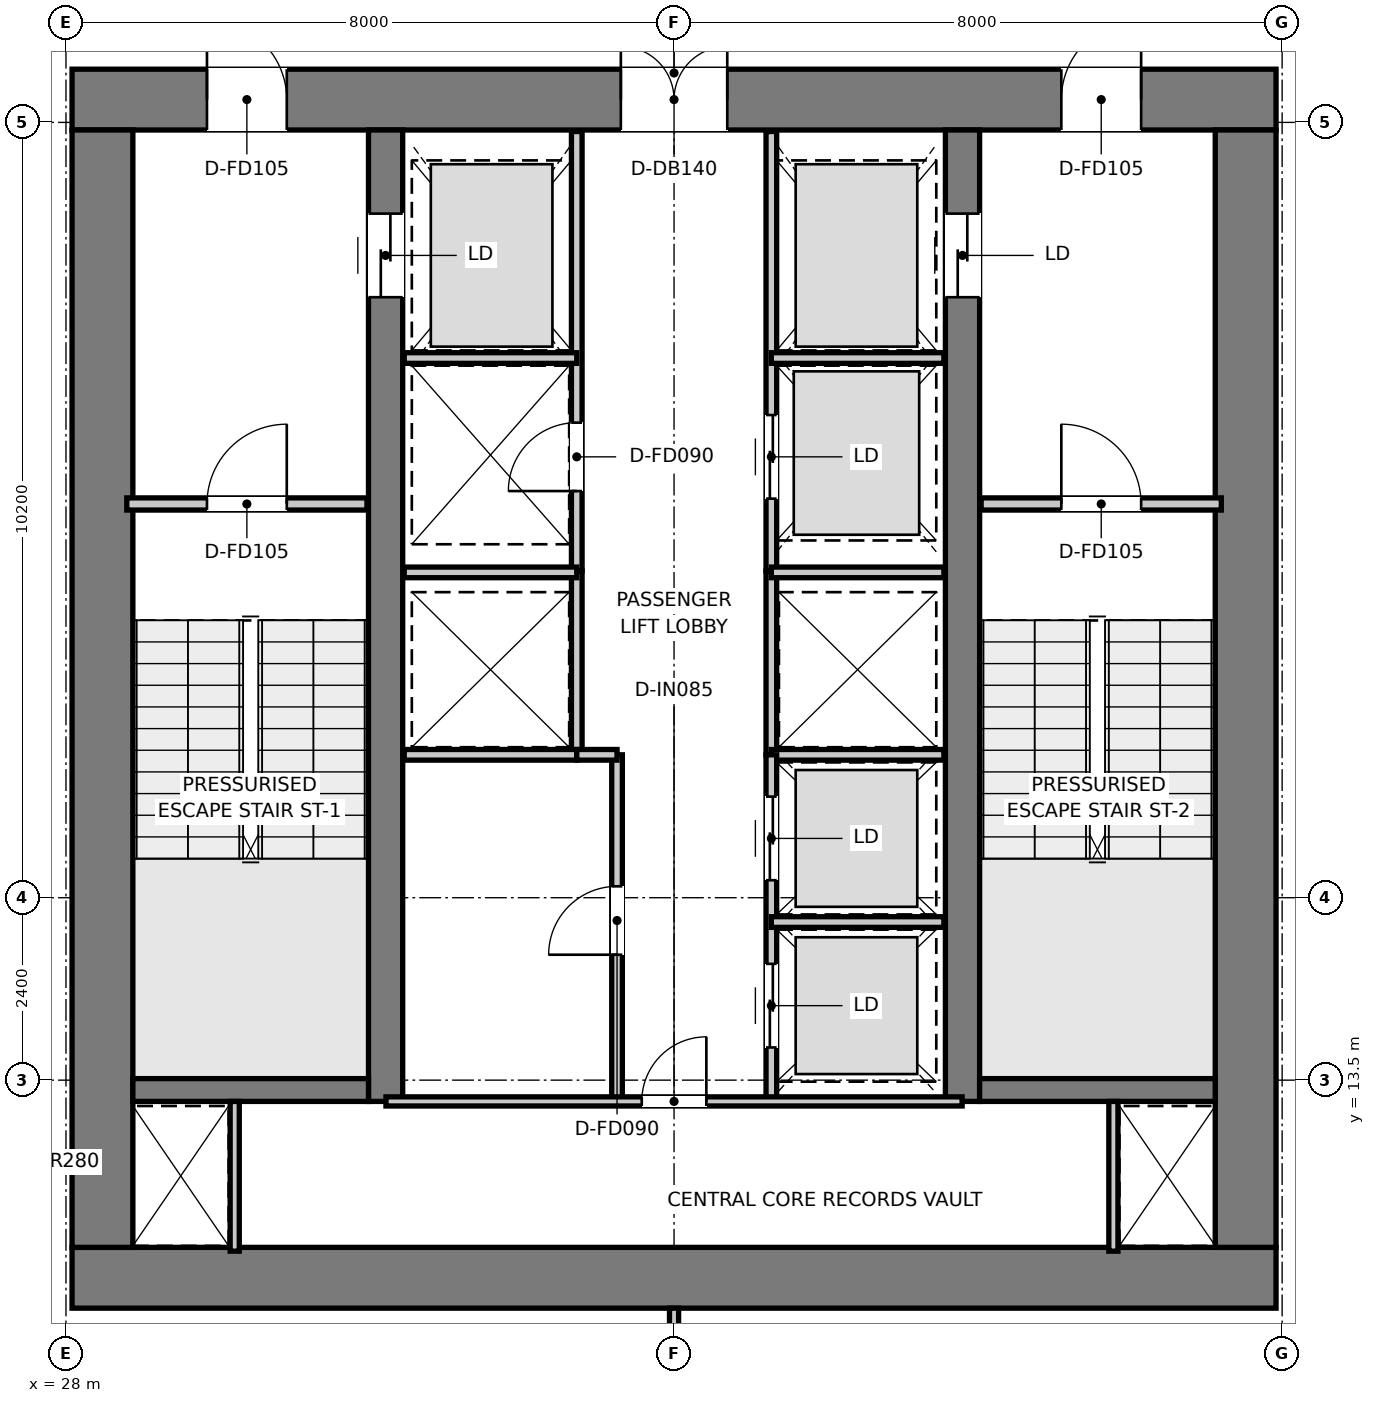
"""IFC4 building model, lengths in metres.
Left out: names, types, materials, properties, quantities, classifications, styles, units other than length and angle.
Written with IfcOpenShell. Run it as: python <this file> out.ifc"""

import sys

from ifc_helpers import new_model, si_unit, direction, frame, frame_2d, origin, place, context, subcontext, project, spatial, rectangle, extrude, element, fill, save


model = new_model("IFC4")
c1 = context("Model", 3, precision=1e-05, world=origin(), true_north=direction((0.0, 1.0)))
c2 = subcontext(c1, "Body", "Model", "MODEL_VIEW")
j1 = project(units=[si_unit("LENGTHUNIT", "METRE"), si_unit("PLANEANGLEUNIT", "RADIAN")], contexts=[c1])
p1 = place(None, origin())
s1 = spatial("IfcSite", under=j1, at=p1, CompositionType="ELEMENT")
p2 = place(p1, origin())
s2 = spatial("IfcBuilding", under=s1, at=p2, CompositionType="ELEMENT")
p3 = place(p2, frame((0.0, 0.0, 211.25)))
s3 = spatial("IfcBuildingStorey", under=s2, at=p3, CompositionType="ELEMENT", Elevation=211.25)
p4 = place(p3, frame((28.08, 10.9, 0.0), z_axis=(0.0, 0.0, 1.0), x_axis=(1.0, 0.0, 0.0)))
e1 = element("IfcWall", 1, at=p4, inside=s3, PredefinedType="SHEAR", context=c2, shape_type="SweptSolid", body=[
    extrude(rectangle(XDim=15.84, YDim=0.8, at=frame_2d((7.92, 0.0))), origin(), (0.0, 0.0, 1.0), 3.95),
])
p5 = place(p3, frame((28.08, 26.4, 0.0), z_axis=(0.0, 0.0, 1.0), x_axis=(1.0, 0.0, 0.0)))
e2 = element("IfcWall", 2, at=p5, inside=s3, PredefinedType="SHEAR", context=c2, shape_type="SweptSolid", body=[
    extrude(rectangle(XDim=15.84, YDim=0.8, at=frame_2d((7.92, 0.0))), origin(), (0.0, 0.0, 1.0), 3.95),
])
p6 = place(p5, frame((7.22, 0.0, 0.0)))
e3 = element("IfcOpeningElement", 3, at=p6, cuts=e2, PredefinedType="OPENING", context=c2, shape_type="SweptSolid", body=[
    extrude(rectangle(XDim=1.4, YDim=2.2, at=frame_2d((0.7, 1.1))), frame((0.0, 0.41, 0.0), z_axis=(0.0, -1.0, 0.0), x_axis=(1.0, 0.0, 0.0)), (0.0, 0.0, 1.0), 0.82),
])
p7 = place(p5, frame((1.775, 0.0, 0.0)))
e4 = element("IfcOpeningElement", 4, at=p7, cuts=e2, PredefinedType="OPENING", context=c2, shape_type="SweptSolid", body=[
    extrude(rectangle(XDim=1.05, YDim=2.1, at=frame_2d((0.525, 1.05))), frame((0.0, 0.41, 0.0), z_axis=(0.0, -1.0, 0.0), x_axis=(1.0, 0.0, 0.0)), (0.0, 0.0, 1.0), 0.82),
])
p8 = place(p5, frame((13.015, 0.0, 0.0)))
e5 = element("IfcOpeningElement", 5, at=p8, cuts=e2, PredefinedType="OPENING", context=c2, shape_type="SweptSolid", body=[
    extrude(rectangle(XDim=1.05, YDim=2.1, at=frame_2d((0.525, 1.05))), frame((0.0, 0.41, 0.0), z_axis=(0.0, -1.0, 0.0), x_axis=(1.0, 0.0, 0.0)), (0.0, 0.0, 1.0), 0.82),
])
for number, where, z_axis, x_axis in (
    (6, (28.48, 11.3, 0.0), (0.0, 0.0, 1.0), (0.0, 1.0, 0.0)),
    (7, (43.52, 11.3, 0.0), (0.0, 0.0, 1.0), (0.0, 1.0, 0.0)),
):
    element("IfcWall", number, at=place(p3, frame(where, z_axis=z_axis, x_axis=x_axis)), inside=s3, PredefinedType="SHEAR", context=c2, shape_type="SweptSolid", body=[
        extrude(rectangle(XDim=14.7, YDim=0.8, at=frame_2d((7.35, 0.0))), origin(), (0.0, 0.0, 1.0), 3.95),
    ])
p9 = place(p3, frame((32.205, 13.22, 0.0), z_axis=(0.0, 0.0, 1.0), x_axis=(0.0, 1.0, 0.0)))
e8 = element("IfcWall", 8, at=p9, inside=s3, PredefinedType="SHEAR", context=c2, shape_type="SweptSolid", body=[
    extrude(rectangle(XDim=12.78, YDim=0.45, at=frame_2d((6.39, 0.0))), origin(), (0.0, 0.0, 1.0), 3.95),
])
p10 = place(p9, frame((10.58, 0.0, 0.0)))
e9 = element("IfcOpeningElement", 9, at=p10, cuts=e8, PredefinedType="OPENING", context=c2, shape_type="SweptSolid", body=[
    extrude(rectangle(XDim=1.1, YDim=2.15, at=frame_2d((0.55, 1.075))), frame((0.0, 0.235, 0.0), z_axis=(0.0, -1.0, 0.0), x_axis=(1.0, 0.0, 0.0)), (0.0, 0.0, 1.0), 0.47),
])
p11 = place(p3, frame((39.795, 13.22, 0.0), z_axis=(0.0, 0.0, 1.0), x_axis=(0.0, 1.0, 0.0)))
e10 = element("IfcWall", 10, at=p11, inside=s3, PredefinedType="SHEAR", context=c2, shape_type="SweptSolid", body=[
    extrude(rectangle(XDim=12.78, YDim=0.45, at=frame_2d((6.39, 0.0))), origin(), (0.0, 0.0, 1.0), 3.95),
])
p12 = place(p11, frame((10.58, 0.0, 0.0)))
e11 = element("IfcOpeningElement", 11, at=p12, cuts=e10, PredefinedType="OPENING", context=c2, shape_type="SweptSolid", body=[
    extrude(rectangle(XDim=1.1, YDim=2.15, at=frame_2d((0.55, 1.075))), frame((0.0, 0.235, 0.0), z_axis=(0.0, -1.0, 0.0), x_axis=(1.0, 0.0, 0.0)), (0.0, 0.0, 1.0), 0.47),
])
for number, where, z_axis, x_axis in (
    (12, (28.88, 13.37, 0.0), (0.0, 0.0, 1.0), (1.0, 0.0, 0.0)),
    (13, (40.02, 13.37, 0.0), (0.0, 0.0, 1.0), (1.0, 0.0, 0.0)),
):
    element("IfcWall", number, at=place(p3, frame(where, z_axis=z_axis, x_axis=x_axis)), inside=s3, PredefinedType="SHEAR", context=c2, shape_type="SweptSolid", body=[
        extrude(rectangle(XDim=3.1, YDim=0.3, at=frame_2d((1.55, 0.0))), origin(), (0.0, 0.0, 1.0), 3.95),
    ])
p13 = place(p3, frame((28.8, 21.08, 0.0), z_axis=(0.0, 0.0, 1.0), x_axis=(1.0, 0.0, 0.0)))
e14 = element("IfcWall", 14, at=p13, inside=s3, PredefinedType="PARTITIONING", context=c2, shape_type="SweptSolid", body=[
    extrude(rectangle(XDim=3.16, YDim=0.16, at=frame_2d((1.58, 0.0))), origin(), (0.0, 0.0, 1.0), 3.67),
])
p14 = place(p13, frame((1.055, 0.0, 0.0)))
e15 = element("IfcOpeningElement", 15, at=p14, cuts=e14, PredefinedType="OPENING", context=c2, shape_type="SweptSolid", body=[
    extrude(rectangle(XDim=1.05, YDim=2.1, at=frame_2d((0.525, 1.05))), frame((0.0, 0.09, 0.0), z_axis=(0.0, -1.0, 0.0), x_axis=(1.0, 0.0, 0.0)), (0.0, 0.0, 1.0), 0.18),
])
p15 = place(p3, frame((40.04, 21.08, 0.0), z_axis=(0.0, 0.0, 1.0), x_axis=(1.0, 0.0, 0.0)))
e16 = element("IfcWall", 16, at=p15, inside=s3, PredefinedType="PARTITIONING", context=c2, shape_type="SweptSolid", body=[
    extrude(rectangle(XDim=3.16, YDim=0.16, at=frame_2d((1.58, 0.0))), origin(), (0.0, 0.0, 1.0), 3.67),
])
p16 = place(p15, frame((1.055, 0.0, 0.0)))
e17 = element("IfcOpeningElement", 17, at=p16, cuts=e16, PredefinedType="OPENING", context=c2, shape_type="SweptSolid", body=[
    extrude(rectangle(XDim=1.05, YDim=2.1, at=frame_2d((0.525, 1.05))), frame((0.0, 0.09, 0.0), z_axis=(0.0, -1.0, 0.0), x_axis=(1.0, 0.0, 0.0)), (0.0, 0.0, 1.0), 0.18),
])
p17 = place(p3, frame((34.72, 20.2, 0.0), z_axis=(0.0, 0.0, 1.0), x_axis=(0.0, 1.0, 0.0)))
e18 = element("IfcWall", 18, at=p17, inside=s3, PredefinedType="PARTITIONING", context=c2, shape_type="SweptSolid", body=[
    extrude(rectangle(XDim=5.78, YDim=0.14, at=frame_2d((2.89, 0.0))), origin(), (0.0, 0.0, 1.0), 2.67),
])
p18 = place(p17, frame((1.05, 0.0, 0.0)))
e19 = element("IfcOpeningElement", 19, at=p18, cuts=e18, PredefinedType="OPENING", context=c2, shape_type="SweptSolid", body=[
    extrude(rectangle(XDim=0.9, YDim=2.1, at=frame_2d((0.45, 1.05))), frame((0.0, 0.08, 0.0), z_axis=(0.0, -1.0, 0.0), x_axis=(1.0, 0.0, 0.0)), (0.0, 0.0, 1.0), 0.16),
])
p19 = place(p3, frame((37.28, 20.2, 0.0), z_axis=(0.0, 0.0, 1.0), x_axis=(0.0, 1.0, 0.0)))
e20 = element("IfcWall", 20, at=p19, inside=s3, PredefinedType="PARTITIONING", context=c2, shape_type="SweptSolid", body=[
    extrude(rectangle(XDim=5.78, YDim=0.14, at=frame_2d((2.89, 0.0))), origin(), (0.0, 0.0, 1.0), 2.67),
])
p20 = place(p19, frame((0.95, 0.0, 0.0)))
e21 = element("IfcOpeningElement", 21, at=p20, cuts=e20, PredefinedType="OPENING", context=c2, shape_type="SweptSolid", body=[
    extrude(rectangle(XDim=1.1, YDim=2.15, at=frame_2d((0.55, 1.075))), frame((0.0, 0.08, 0.0), z_axis=(0.0, -1.0, 0.0), x_axis=(1.0, 0.0, 0.0)), (0.0, 0.0, 1.0), 0.16),
])
for number, where, z_axis, x_axis in (
    (22, (32.45, 23.0, 0.0), (0.0, 0.0, 1.0), (1.0, 0.0, 0.0)),
    (23, (37.28, 23.0, 0.0), (0.0, 0.0, 1.0), (1.0, 0.0, 0.0)),
):
    element("IfcWall", number, at=place(p3, frame(where, z_axis=z_axis, x_axis=x_axis)), inside=s3, PredefinedType="PARTITIONING", context=c2, shape_type="SweptSolid", body=[
        extrude(rectangle(XDim=2.27, YDim=0.14, at=frame_2d((1.135, 0.0))), origin(), (0.0, 0.0, 1.0), 2.67),
    ])
for number, where, z_axis, x_axis in (
    (24, (34.72, 17.78, 0.0), (0.0, 0.0, 1.0), (0.0, 1.0, 0.0)),
    (25, (37.28, 17.78, 0.0), (0.0, 0.0, 1.0), (0.0, 1.0, 0.0)),
):
    element("IfcWall", number, at=place(p3, frame(where, z_axis=z_axis, x_axis=x_axis)), inside=s3, PredefinedType="PARTITIONING", context=c2, shape_type="SweptSolid", body=[
        extrude(rectangle(XDim=2.42, YDim=0.14, at=frame_2d((1.21, 0.0))), origin(), (0.0, 0.0, 1.0), 3.67),
    ])
for number, where, z_axis, x_axis in (
    (26, (32.45, 17.78, 0.0), (0.0, 0.0, 1.0), (1.0, 0.0, 0.0)),
    (27, (32.45, 20.18, 0.0), (0.0, 0.0, 1.0), (1.0, 0.0, 0.0)),
    (28, (37.28, 17.78, 0.0), (0.0, 0.0, 1.0), (1.0, 0.0, 0.0)),
    (29, (37.28, 20.18, 0.0), (0.0, 0.0, 1.0), (1.0, 0.0, 0.0)),
):
    element("IfcWall", number, at=place(p3, frame(where, z_axis=z_axis, x_axis=x_axis)), inside=s3, PredefinedType="PARTITIONING", context=c2, shape_type="SweptSolid", body=[
        extrude(rectangle(XDim=2.27, YDim=0.14, at=frame_2d((1.135, 0.0))), origin(), (0.0, 0.0, 1.0), 3.67),
    ])
p21 = place(p3, frame((35.25, 13.22, 0.0), z_axis=(0.0, 0.0, 1.0), x_axis=(0.0, 1.0, 0.0)))
e30 = element("IfcWall", 30, at=p21, inside=s3, PredefinedType="PARTITIONING", context=c2, shape_type="SweptSolid", body=[
    extrude(rectangle(XDim=4.56, YDim=0.14, at=frame_2d((2.28, 0.0))), origin(), (0.0, 0.0, 1.0), 3.67),
])
p22 = place(p21, frame((1.93, 0.0, 0.0)))
e31 = element("IfcOpeningElement", 31, at=p22, cuts=e30, PredefinedType="OPENING", context=c2, shape_type="SweptSolid", body=[
    extrude(rectangle(XDim=0.9, YDim=2.1, at=frame_2d((0.45, 1.05))), frame((0.0, 0.08, 0.0), z_axis=(0.0, -1.0, 0.0), x_axis=(1.0, 0.0, 0.0)), (0.0, 0.0, 1.0), 0.16),
])
p23 = place(p3, frame((34.72, 17.78, 0.0), z_axis=(0.0, 0.0, 1.0), x_axis=(1.0, 0.0, 0.0)))
e32 = element("IfcWall", 32, at=p23, inside=s3, PredefinedType="PARTITIONING", context=c2, shape_type="SweptSolid", body=[
    extrude(rectangle(XDim=0.53, YDim=0.14, at=frame_2d((0.265, 0.0))), origin(), (0.0, 0.0, 1.0), 3.67),
])
p24 = place(p3, frame((37.28, 13.22, 0.0), z_axis=(0.0, 0.0, 1.0), x_axis=(0.0, 1.0, 0.0)))
e33 = element("IfcWall", 33, at=p24, inside=s3, PredefinedType="PARTITIONING", context=c2, shape_type="SweptSolid", body=[
    extrude(rectangle(XDim=4.56, YDim=0.14, at=frame_2d((2.28, 0.0))), origin(), (0.0, 0.0, 1.0), 3.67),
])
p25 = place(p24, frame((0.71, 0.0, 0.0)))
e34 = element("IfcOpeningElement", 34, at=p25, cuts=e33, PredefinedType="OPENING", context=c2, shape_type="SweptSolid", body=[
    extrude(rectangle(XDim=1.1, YDim=2.15, at=frame_2d((0.55, 1.075))), frame((0.0, 0.08, 0.0), z_axis=(0.0, -1.0, 0.0), x_axis=(1.0, 0.0, 0.0)), (0.0, 0.0, 1.0), 0.16),
])
p26 = place(p24, frame((2.91, 0.0, 0.0)))
e35 = element("IfcOpeningElement", 35, at=p26, cuts=e33, PredefinedType="OPENING", context=c2, shape_type="SweptSolid", body=[
    extrude(rectangle(XDim=1.1, YDim=2.15, at=frame_2d((0.55, 1.075))), frame((0.0, 0.08, 0.0), z_axis=(0.0, -1.0, 0.0), x_axis=(1.0, 0.0, 0.0)), (0.0, 0.0, 1.0), 0.16),
])
p27 = place(p3, frame((37.28, 15.58, 0.0), z_axis=(0.0, 0.0, 1.0), x_axis=(1.0, 0.0, 0.0)))
e36 = element("IfcWall", 36, at=p27, inside=s3, PredefinedType="PARTITIONING", context=c2, shape_type="SweptSolid", body=[
    extrude(rectangle(XDim=2.27, YDim=0.14, at=frame_2d((1.135, 0.0))), origin(), (0.0, 0.0, 1.0), 3.67),
])
for number, where, z_axis, x_axis in (
    (37, (30.22, 11.25, 0.0), (0.0, 0.0, 1.0), (0.0, 1.0, 0.0)),
    (38, (41.78, 11.25, 0.0), (0.0, 0.0, 1.0), (0.0, 1.0, 0.0)),
):
    element("IfcWall", number, at=place(p3, frame(where, z_axis=z_axis, x_axis=x_axis)), inside=s3, PredefinedType="PARTITIONING", context=c2, shape_type="SweptSolid", body=[
        extrude(rectangle(XDim=1.97, YDim=0.12, at=frame_2d((0.985, 0.0))), origin(), (0.0, 0.0, 1.0), 3.67),
    ])
p28 = place(p3, frame((32.21, 13.22, 0.0), z_axis=(0.0, 0.0, 1.0), x_axis=(1.0, 0.0, 0.0)))
e39 = element("IfcWall", 39, at=p28, inside=s3, PredefinedType="PARTITIONING", context=c2, shape_type="SweptSolid", body=[
    extrude(rectangle(XDim=7.58, YDim=0.12, at=frame_2d((3.79, 0.0))), origin(), (0.0, 0.0, 1.0), 3.67),
])
p29 = place(p28, frame((3.365, 0.0, 0.0)))
e40 = element("IfcOpeningElement", 40, at=p29, cuts=e39, PredefinedType="OPENING", context=c2, shape_type="SweptSolid", body=[
    extrude(rectangle(XDim=0.85, YDim=2.1, at=frame_2d((0.425, 1.05))), frame((0.0, 0.07, 0.0), z_axis=(0.0, -1.0, 0.0), x_axis=(1.0, 0.0, 0.0)), (0.0, 0.0, 1.0), 0.14),
])
p30 = place(p3, frame((36.0, 3.12, 0.0), z_axis=(0.0, 0.0, 1.0), x_axis=(0.0, 1.0, 0.0)))
e41 = element("IfcWall", 41, at=p30, inside=s3, PredefinedType="PARTITIONING", context=c2, shape_type="SweptSolid", body=[
    extrude(rectangle(XDim=7.38, YDim=0.12, at=frame_2d((3.69, 0.0))), origin(), (0.0, 0.0, 1.0), 3.67),
])
p31 = place(p14, origin())
e42 = element("IfcDoor", 42, at=p31, inside=s3, OperationType="SINGLE_SWING_RIGHT", PredefinedType="DOOR", context=c2, shape_type="SweptSolid", body=[
    extrude(rectangle(XDim=1.05, YDim=2.1, at=frame_2d((0.525, 1.05))), frame((0.0, 0.025, 0.0), z_axis=(0.0, -1.0, 0.0), x_axis=(1.0, 0.0, 0.0)), (0.0, 0.0, 1.0), 0.05),
])
fill(e15, e42)
p32 = place(p16, origin())
e43 = element("IfcDoor", 43, at=p32, inside=s3, OperationType="SINGLE_SWING_LEFT", PredefinedType="DOOR", context=c2, shape_type="SweptSolid", body=[
    extrude(rectangle(XDim=1.05, YDim=2.1, at=frame_2d((0.525, 1.05))), frame((0.0, 0.025, 0.0), z_axis=(0.0, -1.0, 0.0), x_axis=(1.0, 0.0, 0.0)), (0.0, 0.0, 1.0), 0.05),
])
fill(e17, e43)
p33 = place(p6, origin())
e44 = element("IfcDoor", 44, at=p33, inside=s3, OperationType="DOUBLE_DOOR_SINGLE_SWING", PredefinedType="DOOR", context=c2, shape_type="SweptSolid", body=[
    extrude(rectangle(XDim=1.4, YDim=2.2, at=frame_2d((0.7, 1.1))), frame((0.0, 0.025, 0.0), z_axis=(0.0, -1.0, 0.0), x_axis=(1.0, 0.0, 0.0)), (0.0, 0.0, 1.0), 0.05),
])
fill(e3, e44)
p34 = place(p7, origin())
e45 = element("IfcDoor", 45, at=p34, inside=s3, OperationType="SINGLE_SWING_LEFT", PredefinedType="DOOR", context=c2, shape_type="SweptSolid", body=[
    extrude(rectangle(XDim=1.05, YDim=2.1, at=frame_2d((0.525, 1.05))), frame((0.0, 0.025, 0.0), z_axis=(0.0, -1.0, 0.0), x_axis=(1.0, 0.0, 0.0)), (0.0, 0.0, 1.0), 0.05),
])
fill(e4, e45)
p35 = place(p8, origin())
e46 = element("IfcDoor", 46, at=p35, inside=s3, OperationType="SINGLE_SWING_RIGHT", PredefinedType="DOOR", context=c2, shape_type="SweptSolid", body=[
    extrude(rectangle(XDim=1.05, YDim=2.1, at=frame_2d((0.525, 1.05))), frame((0.0, 0.025, 0.0), z_axis=(0.0, -1.0, 0.0), x_axis=(1.0, 0.0, 0.0)), (0.0, 0.0, 1.0), 0.05),
])
fill(e5, e46)
p36 = place(p10, origin())
e47 = element("IfcDoor", 47, at=p36, inside=s3, OperationType="DOUBLE_DOOR_SLIDING", PredefinedType="DOOR", context=c2, shape_type="SweptSolid", body=[
    extrude(rectangle(XDim=1.1, YDim=2.15, at=frame_2d((0.55, 1.075))), frame((0.0, 0.025, 0.0), z_axis=(0.0, -1.0, 0.0), x_axis=(1.0, 0.0, 0.0)), (0.0, 0.0, 1.0), 0.05),
])
fill(e9, e47)
p37 = place(p12, origin())
e48 = element("IfcDoor", 48, at=p37, inside=s3, OperationType="DOUBLE_DOOR_SLIDING", PredefinedType="DOOR", context=c2, shape_type="SweptSolid", body=[
    extrude(rectangle(XDim=1.1, YDim=2.15, at=frame_2d((0.55, 1.075))), frame((0.0, 0.025, 0.0), z_axis=(0.0, -1.0, 0.0), x_axis=(1.0, 0.0, 0.0)), (0.0, 0.0, 1.0), 0.05),
])
fill(e11, e48)
p38 = place(p18, origin())
e49 = element("IfcDoor", 49, at=p38, inside=s3, OperationType="SINGLE_SWING_LEFT", PredefinedType="DOOR", context=c2, shape_type="SweptSolid", body=[
    extrude(rectangle(XDim=0.9, YDim=2.1, at=frame_2d((0.45, 1.05))), frame((0.0, 0.025, 0.0), z_axis=(0.0, -1.0, 0.0), x_axis=(1.0, 0.0, 0.0)), (0.0, 0.0, 1.0), 0.05),
])
fill(e19, e49)
p39 = place(p20, origin())
e50 = element("IfcDoor", 50, at=p39, inside=s3, OperationType="DOUBLE_DOOR_SLIDING", PredefinedType="DOOR", context=c2, shape_type="SweptSolid", body=[
    extrude(rectangle(XDim=1.1, YDim=2.15, at=frame_2d((0.55, 1.075))), frame((0.0, 0.025, 0.0), z_axis=(0.0, -1.0, 0.0), x_axis=(1.0, 0.0, 0.0)), (0.0, 0.0, 1.0), 0.05),
])
fill(e21, e50)
p40 = place(p22, origin())
e51 = element("IfcDoor", 51, at=p40, inside=s3, OperationType="SINGLE_SWING_LEFT", PredefinedType="DOOR", context=c2, shape_type="SweptSolid", body=[
    extrude(rectangle(XDim=0.9, YDim=2.1, at=frame_2d((0.45, 1.05))), frame((0.0, 0.025, 0.0), z_axis=(0.0, -1.0, 0.0), x_axis=(1.0, 0.0, 0.0)), (0.0, 0.0, 1.0), 0.05),
])
fill(e31, e51)
p41 = place(p25, origin())
e52 = element("IfcDoor", 52, at=p41, inside=s3, OperationType="DOUBLE_DOOR_SLIDING", PredefinedType="DOOR", context=c2, shape_type="SweptSolid", body=[
    extrude(rectangle(XDim=1.1, YDim=2.15, at=frame_2d((0.55, 1.075))), frame((0.0, 0.025, 0.0), z_axis=(0.0, -1.0, 0.0), x_axis=(1.0, 0.0, 0.0)), (0.0, 0.0, 1.0), 0.05),
])
fill(e34, e52)
p42 = place(p26, origin())
e53 = element("IfcDoor", 53, at=p42, inside=s3, OperationType="DOUBLE_DOOR_SLIDING", PredefinedType="DOOR", context=c2, shape_type="SweptSolid", body=[
    extrude(rectangle(XDim=1.1, YDim=2.15, at=frame_2d((0.55, 1.075))), frame((0.0, 0.025, 0.0), z_axis=(0.0, -1.0, 0.0), x_axis=(1.0, 0.0, 0.0)), (0.0, 0.0, 1.0), 0.05),
])
fill(e35, e53)
p43 = place(p29, origin())
e54 = element("IfcDoor", 54, at=p43, inside=s3, OperationType="SINGLE_SWING_RIGHT", PredefinedType="DOOR", context=c2, shape_type="SweptSolid", body=[
    extrude(rectangle(XDim=0.85, YDim=2.1, at=frame_2d((0.425, 1.05))), frame((0.0, 0.025, 0.0), z_axis=(0.0, -1.0, 0.0), x_axis=(1.0, 0.0, 0.0)), (0.0, 0.0, 1.0), 0.05),
])
fill(e40, e54)
save(model, sys.argv[1])
